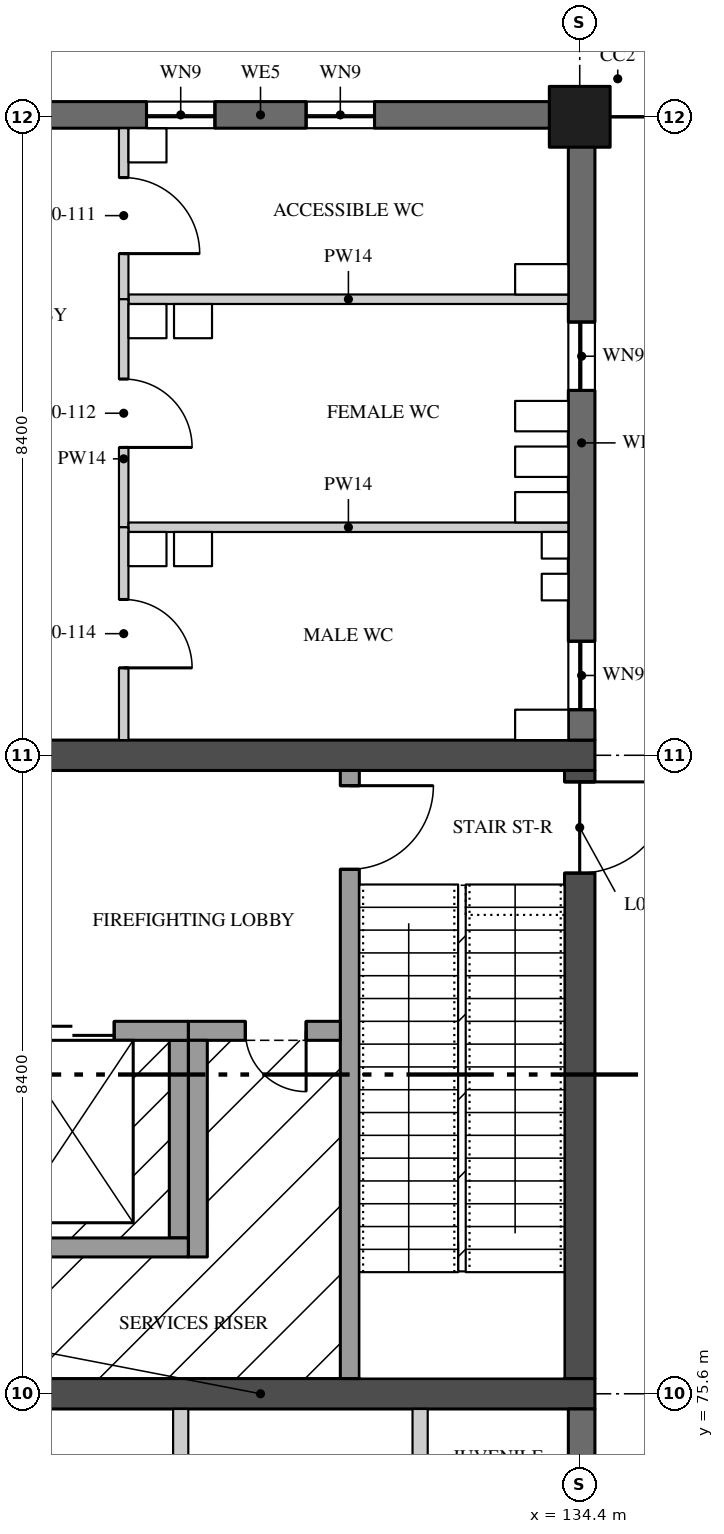
"""IFC4 building model, lengths in metres.
Left out: names, types, materials, properties, quantities, classifications, styles, units other than length and angle.
Written with IfcOpenShell. Run it as: python <this file> out.ifc"""

import sys

from ifc_helpers import new_model, si_unit, direction, frame, frame_2d, origin, origin_2d, place, context, subcontext, project, spatial, rectangle, extrude, element, fill, save


model = new_model("IFC4")
c1 = context("Model", 3, precision=1e-05, world=origin(), true_north=direction((0.0, 1.0)))
c2 = subcontext(c1, "Body", "Model", "MODEL_VIEW")
j1 = project(units=[si_unit("LENGTHUNIT", "METRE"), si_unit("PLANEANGLEUNIT", "RADIAN")], contexts=[c1])
p1 = place(None, origin())
s1 = spatial("IfcSite", under=j1, at=p1, CompositionType="ELEMENT")
p2 = place(p1, origin())
s2 = spatial("IfcBuilding", under=s1, at=p2, CompositionType="ELEMENT")
p3 = place(p2, origin())
s3 = spatial("IfcBuildingStorey", under=s2, at=p3, CompositionType="ELEMENT", Elevation=0.0)
p4 = place(p3, frame((134.4, 92.4, 0.0), z_axis=(0.0, 0.0, 1.0), x_axis=(1.0, 0.0, 0.0)))
e1 = element("IfcColumn", 1, at=p4, inside=s3, PredefinedType="COLUMN", context=c2, shape_type="SweptSolid", body=[
    extrude(rectangle(XDim=0.8, YDim=0.8, at=origin_2d()), origin(), (0.0, 0.0, 1.0), 5.05),
])
for number, where, z_axis, x_axis in (
    (2, (125.8, 75.6, 0.0), (0.0, 0.0, 1.0), (1.0, 0.0, 0.0)),
    (3, (125.8, 84.0, 0.0), (0.0, 0.0, 1.0), (1.0, 0.0, 0.0)),
):
    element("IfcWall", number, at=place(p3, frame(where, z_axis=z_axis, x_axis=x_axis)), inside=s3, PredefinedType="SHEAR", context=c2, shape_type="SweptSolid", body=[
        extrude(rectangle(XDim=8.8, YDim=0.4, at=frame_2d((4.4, 0.0))), origin(), (0.0, 0.0, 1.0), 5.05),
    ])
p5 = place(p3, frame((134.4, 75.8, 0.0), z_axis=(0.0, 0.0, 1.0), x_axis=(0.0, 1.0, 0.0)))
e4 = element("IfcWall", 4, at=p5, inside=s3, PredefinedType="SHEAR", context=c2, shape_type="SweptSolid", body=[
    extrude(rectangle(XDim=8.0, YDim=0.4, at=frame_2d((4.0, 0.0))), origin(), (0.0, 0.0, 1.0), 5.05),
])
p6 = place(p5, frame((6.65, 0.0, 0.0)))
e5 = element("IfcOpeningElement", 5, at=p6, cuts=e4, PredefinedType="OPENING", context=c2, shape_type="SweptSolid", body=[
    extrude(rectangle(XDim=1.2, YDim=2.1, at=frame_2d((0.6, 1.05))), frame((0.0, 0.21, 0.0), z_axis=(0.0, -1.0, 0.0), x_axis=(1.0, 0.0, 0.0)), (0.0, 0.0, 1.0), 0.42),
])
p7 = place(p3, frame((131.375, 83.8, 0.0), z_axis=(0.0, 0.0, 1.0), x_axis=(0.0, -1.0, 0.0)))
e6 = element("IfcWall", 6, at=p7, inside=s3, PredefinedType="SOLIDWALL", context=c2, shape_type="SweptSolid", body=[
    extrude(rectangle(XDim=8.0, YDim=0.25, at=frame_2d((4.0, 0.0))), origin(), (0.0, 0.0, 1.0), 5.05),
])
p8 = place(p7, frame((0.2, 0.0, 0.0)))
e7 = element("IfcOpeningElement", 7, at=p8, cuts=e6, PredefinedType="OPENING", context=c2, shape_type="SweptSolid", body=[
    extrude(rectangle(XDim=1.1, YDim=2.1, at=frame_2d((0.55, 1.05))), frame((0.0, 0.135, 0.0), z_axis=(0.0, -1.0, 0.0), x_axis=(1.0, 0.0, 0.0)), (0.0, 0.0, 1.0), 0.27),
])
p9 = place(p3, frame((131.25, 80.375, 0.0), z_axis=(0.0, 0.0, 1.0), x_axis=(-1.0, 0.0, 0.0)))
e8 = element("IfcWall", 8, at=p9, inside=s3, PredefinedType="SOLIDWALL", context=c2, shape_type="SweptSolid", body=[
    extrude(rectangle(XDim=2.0, YDim=0.25, at=frame_2d((1.0, 0.0))), origin(), (0.0, 0.0, 1.0), 5.05),
])
p10 = place(p9, frame((0.45, 0.0, 0.0)))
e9 = element("IfcOpeningElement", 9, at=p10, cuts=e8, PredefinedType="OPENING", context=c2, shape_type="SweptSolid", body=[
    extrude(rectangle(XDim=0.8, YDim=2.1, at=frame_2d((0.4, 1.05))), frame((0.0, 0.135, 0.0), z_axis=(0.0, -1.0, 0.0), x_axis=(1.0, 0.0, 0.0)), (0.0, 0.0, 1.0), 0.27),
])
p11 = place(p3, frame((129.375, 80.25, 0.0), z_axis=(0.0, 0.0, 1.0), x_axis=(0.0, -1.0, 0.0)))
e10 = element("IfcWall", 10, at=p11, inside=s3, PredefinedType="SOLIDWALL", context=c2, shape_type="SweptSolid", body=[
    extrude(rectangle(XDim=2.85, YDim=0.25, at=frame_2d((1.425, 0.0))), origin(), (0.0, 0.0, 1.0), 5.05),
])
p12 = place(p3, frame((129.125, 77.65, 0.0), z_axis=(0.0, 0.0, 1.0), x_axis=(0.0, 1.0, 0.0)))
e11 = element("IfcWall", 11, at=p12, inside=s3, PredefinedType="SOLIDWALL", context=c2, shape_type="SweptSolid", body=[
    extrude(rectangle(XDim=2.6, YDim=0.25, at=frame_2d((1.3, 0.0))), origin(), (0.0, 0.0, 1.0), 5.05),
])
p13 = place(p3, frame((126.2, 80.375, 0.0), z_axis=(0.0, 0.0, 1.0), x_axis=(1.0, 0.0, 0.0)))
e12 = element("IfcWall", 12, at=p13, inside=s3, PredefinedType="SOLIDWALL", context=c2, shape_type="SweptSolid", body=[
    extrude(rectangle(XDim=3.05, YDim=0.25, at=frame_2d((1.525, 0.0))), origin(), (0.0, 0.0, 1.0), 5.05),
])
p14 = place(p13, frame((0.975, 0.0, 0.0)))
e13 = element("IfcOpeningElement", 13, at=p14, cuts=e12, PredefinedType="OPENING", context=c2, shape_type="SweptSolid", body=[
    extrude(rectangle(XDim=1.1, YDim=2.1, at=frame_2d((0.55, 1.05))), frame((0.0, 0.135, 0.0), z_axis=(0.0, -1.0, 0.0), x_axis=(1.0, 0.0, 0.0)), (0.0, 0.0, 1.0), 0.27),
])
p15 = place(p3, frame((126.2, 77.525, 0.0), z_axis=(0.0, 0.0, 1.0), x_axis=(1.0, 0.0, 0.0)))
e14 = element("IfcWall", 14, at=p15, inside=s3, PredefinedType="SOLIDWALL", context=c2, shape_type="SweptSolid", body=[
    extrude(rectangle(XDim=3.05, YDim=0.25, at=frame_2d((1.525, 0.0))), origin(), (0.0, 0.0, 1.0), 5.05),
])
for number, where, z_axis, x_axis in (
    (15, (129.15, 72.4, 0.0), (0.0, 0.0, 1.0), (0.0, 1.0, 0.0)),
    (16, (132.3, 72.4, 0.0), (0.0, 0.0, 1.0), (0.0, 1.0, 0.0)),
):
    element("IfcWall", number, at=place(p3, frame(where, z_axis=z_axis, x_axis=x_axis)), inside=s3, PredefinedType="PARTITIONING", context=c2, shape_type="SweptSolid", body=[
        extrude(rectangle(XDim=3.0, YDim=0.2, at=frame_2d((1.5, 0.0))), origin(), (0.0, 0.0, 1.0), 5.05),
    ])
p16 = place(p3, frame((128.463, 90.0, 0.0), z_axis=(0.0, 0.0, 1.0), x_axis=(1.0, 0.0, 0.0)))
e17 = element("IfcWall", 17, at=p16, inside=s3, PredefinedType="PARTITIONING", context=c2, shape_type="SweptSolid", body=[
    extrude(rectangle(XDim=5.787, YDim=0.125, at=frame_2d((2.894, 0.0))), origin(), (0.0, 0.0, 1.0), 5.05),
])
p17 = place(p3, frame((128.4, 90.0, 0.0), z_axis=(0.0, 0.0, 1.0), x_axis=(0.0, 1.0, 0.0)))
e18 = element("IfcWall", 18, at=p17, inside=s3, PredefinedType="PARTITIONING", context=c2, shape_type="SweptSolid", body=[
    extrude(rectangle(XDim=2.25, YDim=0.125, at=frame_2d((1.125, 0.0))), origin(), (0.0, 0.0, 1.0), 5.05),
])
p18 = place(p17, frame((0.6, 0.0, 0.0)))
e19 = element("IfcOpeningElement", 19, at=p18, cuts=e18, PredefinedType="OPENING", context=c2, shape_type="SweptSolid", body=[
    extrude(rectangle(XDim=1.0, YDim=2.1, at=frame_2d((0.5, 1.05))), frame((0.0, 0.073, 0.0), z_axis=(0.0, -1.0, 0.0), x_axis=(1.0, 0.0, 0.0)), (0.0, 0.0, 1.0), 0.145),
])
p19 = place(p3, frame((128.4, 87.0, 0.0), z_axis=(0.0, 0.0, 1.0), x_axis=(0.0, 1.0, 0.0)))
e20 = element("IfcWall", 20, at=p19, inside=s3, PredefinedType="PARTITIONING", context=c2, shape_type="SweptSolid", body=[
    extrude(rectangle(XDim=3.0, YDim=0.125, at=frame_2d((1.5, 0.0))), origin(), (0.0, 0.0, 1.0), 5.05),
])
p20 = place(p19, frame((1.05, 0.0, 0.0)))
e21 = element("IfcOpeningElement", 21, at=p20, cuts=e20, PredefinedType="OPENING", context=c2, shape_type="SweptSolid", body=[
    extrude(rectangle(XDim=0.9, YDim=2.1, at=frame_2d((0.45, 1.05))), frame((0.0, 0.073, 0.0), z_axis=(0.0, -1.0, 0.0), x_axis=(1.0, 0.0, 0.0)), (0.0, 0.0, 1.0), 0.145),
])
p21 = place(p3, frame((128.463, 87.0, 0.0), z_axis=(0.0, 0.0, 1.0), x_axis=(1.0, 0.0, 0.0)))
e22 = element("IfcWall", 22, at=p21, inside=s3, PredefinedType="PARTITIONING", context=c2, shape_type="SweptSolid", body=[
    extrude(rectangle(XDim=5.787, YDim=0.125, at=frame_2d((2.894, 0.0))), origin(), (0.0, 0.0, 1.0), 5.05),
])
p22 = place(p3, frame((128.4, 84.2, 0.0), z_axis=(0.0, 0.0, 1.0), x_axis=(0.0, 1.0, 0.0)))
e23 = element("IfcWall", 23, at=p22, inside=s3, PredefinedType="PARTITIONING", context=c2, shape_type="SweptSolid", body=[
    extrude(rectangle(XDim=2.8, YDim=0.125, at=frame_2d((1.4, 0.0))), origin(), (0.0, 0.0, 1.0), 5.05),
])
p23 = place(p22, frame((0.95, 0.0, 0.0)))
e24 = element("IfcOpeningElement", 24, at=p23, cuts=e23, PredefinedType="OPENING", context=c2, shape_type="SweptSolid", body=[
    extrude(rectangle(XDim=0.9, YDim=2.1, at=frame_2d((0.45, 1.05))), frame((0.0, 0.073, 0.0), z_axis=(0.0, -1.0, 0.0), x_axis=(1.0, 0.0, 0.0)), (0.0, 0.0, 1.0), 0.145),
])
p24 = place(p3, frame((134.425, 67.58, 0.0), z_axis=(0.0, 0.0, 1.0), x_axis=(0.0, 1.0, 0.0)))
e25 = element("IfcWall", 25, at=p24, inside=s3, PredefinedType="SOLIDWALL", context=c2, shape_type="SweptSolid", body=[
    extrude(rectangle(XDim=7.82, YDim=0.35, at=frame_2d((3.91, 0.0))), origin(), (0.0, 0.0, 1.0), 5.05),
])
p25 = place(p3, frame((134.425, 84.2, 0.0), z_axis=(0.0, 0.0, 1.0), x_axis=(0.0, 1.0, 0.0)))
e26 = element("IfcWall", 26, at=p25, inside=s3, PredefinedType="SOLIDWALL", context=c2, shape_type="SweptSolid", body=[
    extrude(rectangle(XDim=7.82, YDim=0.35, at=frame_2d((3.91, 0.0))), origin(), (0.0, 0.0, 1.0), 5.05),
])
p26 = place(p25, frame((0.4, 0.0, 1.5)))
e27 = element("IfcOpeningElement", 27, at=p26, cuts=e26, PredefinedType="OPENING", context=c2, shape_type="SweptSolid", body=[
    extrude(rectangle(XDim=0.9, YDim=1.2, at=frame_2d((0.45, 0.6))), frame((0.0, 0.185, 0.0), z_axis=(0.0, -1.0, 0.0), x_axis=(1.0, 0.0, 0.0)), (0.0, 0.0, 1.0), 0.37),
])
p27 = place(p25, frame((4.6, 0.0, 1.5)))
e28 = element("IfcOpeningElement", 28, at=p27, cuts=e26, PredefinedType="OPENING", context=c2, shape_type="SweptSolid", body=[
    extrude(rectangle(XDim=0.9, YDim=1.2, at=frame_2d((0.45, 0.6))), frame((0.0, 0.185, 0.0), z_axis=(0.0, -1.0, 0.0), x_axis=(1.0, 0.0, 0.0)), (0.0, 0.0, 1.0), 0.37),
])
p28 = place(p3, frame((134.02, 92.425, 0.0), z_axis=(0.0, 0.0, 1.0), x_axis=(-1.0, 0.0, 0.0)))
e29 = element("IfcWall", 29, at=p28, inside=s3, PredefinedType="SOLIDWALL", context=c2, shape_type="SweptSolid", body=[
    extrude(rectangle(XDim=7.64, YDim=0.35, at=frame_2d((3.82, 0.0))), origin(), (0.0, 0.0, 1.0), 5.05),
])
p29 = place(p28, frame((2.32, 0.0, 1.5)))
e30 = element("IfcOpeningElement", 30, at=p29, cuts=e29, PredefinedType="OPENING", context=c2, shape_type="SweptSolid", body=[
    extrude(rectangle(XDim=0.9, YDim=1.2, at=frame_2d((0.45, 0.6))), frame((0.0, 0.185, 0.0), z_axis=(0.0, -1.0, 0.0), x_axis=(1.0, 0.0, 0.0)), (0.0, 0.0, 1.0), 0.37),
])
p30 = place(p28, frame((4.42, 0.0, 1.5)))
e31 = element("IfcOpeningElement", 31, at=p30, cuts=e29, PredefinedType="OPENING", context=c2, shape_type="SweptSolid", body=[
    extrude(rectangle(XDim=0.9, YDim=1.2, at=frame_2d((0.45, 0.6))), frame((0.0, 0.185, 0.0), z_axis=(0.0, -1.0, 0.0), x_axis=(1.0, 0.0, 0.0)), (0.0, 0.0, 1.0), 0.37),
])
p31 = place(p10, origin())
e32 = element("IfcDoor", 32, at=p31, inside=s3, OperationType="SINGLE_SWING_RIGHT", PredefinedType="DOOR", context=c2, shape_type="SweptSolid", body=[
    extrude(rectangle(XDim=0.8, YDim=2.1, at=frame_2d((0.4, 1.05))), frame((0.0, 0.035, 0.0), z_axis=(0.0, -1.0, 0.0), x_axis=(1.0, 0.0, 0.0)), (0.0, 0.0, 1.0), 0.07),
])
fill(e9, e32)
p32 = place(p8, origin())
e33 = element("IfcDoor", 33, at=p32, inside=s3, OperationType="SINGLE_SWING_RIGHT", PredefinedType="DOOR", context=c2, shape_type="SweptSolid", body=[
    extrude(rectangle(XDim=1.1, YDim=2.1, at=frame_2d((0.55, 1.05))), frame((0.0, 0.035, 0.0), z_axis=(0.0, -1.0, 0.0), x_axis=(1.0, 0.0, 0.0)), (0.0, 0.0, 1.0), 0.07),
])
fill(e7, e33)
p33 = place(p6, frame((1.2, 0.0, 0.0), z_axis=(0.0, 0.0, 1.0), x_axis=(-1.0, 0.0, 0.0)))
e34 = element("IfcDoor", 34, at=p33, inside=s3, OperationType="SINGLE_SWING_RIGHT", PredefinedType="DOOR", context=c2, shape_type="SweptSolid", body=[
    extrude(rectangle(XDim=1.2, YDim=2.1, at=frame_2d((0.6, 1.05))), frame((0.0, 0.035, 0.0), z_axis=(0.0, -1.0, 0.0), x_axis=(1.0, 0.0, 0.0)), (0.0, 0.0, 1.0), 0.07),
])
fill(e5, e34)
p34 = place(p14, origin())
e35 = element("IfcDoor", 35, at=p34, inside=s3, OperationType="DOUBLE_DOOR_SLIDING", PredefinedType="DOOR", context=c2, shape_type="SweptSolid", body=[
    extrude(rectangle(XDim=1.1, YDim=2.1, at=frame_2d((0.55, 1.05))), frame((0.0, 0.04, 0.0), z_axis=(0.0, -1.0, 0.0), x_axis=(1.0, 0.0, 0.0)), (0.0, 0.0, 1.0), 0.08),
])
fill(e13, e35)
p35 = place(p18, frame((1.0, 0.0, 0.0), z_axis=(0.0, 0.0, 1.0), x_axis=(-1.0, 0.0, 0.0)))
e36 = element("IfcDoor", 36, at=p35, inside=s3, OperationType="SINGLE_SWING_LEFT", PredefinedType="DOOR", context=c2, shape_type="SweptSolid", body=[
    extrude(rectangle(XDim=1.0, YDim=2.1, at=frame_2d((0.5, 1.05))), frame((0.0, 0.02, 0.0), z_axis=(0.0, -1.0, 0.0), x_axis=(1.0, 0.0, 0.0)), (0.0, 0.0, 1.0), 0.04),
])
fill(e19, e36)
p36 = place(p20, frame((0.9, 0.0, 0.0), z_axis=(0.0, 0.0, 1.0), x_axis=(-1.0, 0.0, 0.0)))
e37 = element("IfcDoor", 37, at=p36, inside=s3, OperationType="SINGLE_SWING_LEFT", PredefinedType="DOOR", context=c2, shape_type="SweptSolid", body=[
    extrude(rectangle(XDim=0.9, YDim=2.1, at=frame_2d((0.45, 1.05))), frame((0.0, 0.02, 0.0), z_axis=(0.0, -1.0, 0.0), x_axis=(1.0, 0.0, 0.0)), (0.0, 0.0, 1.0), 0.04),
])
fill(e21, e37)
p37 = place(p23, frame((0.9, 0.0, 0.0), z_axis=(0.0, 0.0, 1.0), x_axis=(-1.0, 0.0, 0.0)))
e38 = element("IfcDoor", 38, at=p37, inside=s3, OperationType="SINGLE_SWING_LEFT", PredefinedType="DOOR", context=c2, shape_type="SweptSolid", body=[
    extrude(rectangle(XDim=0.9, YDim=2.1, at=frame_2d((0.45, 1.05))), frame((0.0, 0.02, 0.0), z_axis=(0.0, -1.0, 0.0), x_axis=(1.0, 0.0, 0.0)), (0.0, 0.0, 1.0), 0.04),
])
fill(e24, e38)
p38 = place(p26, origin())
e39 = element("IfcWindow", 39, at=p38, inside=s3, PartitioningType="SINGLE_PANEL", PredefinedType="WINDOW", context=c2, shape_type="SweptSolid", body=[
    extrude(rectangle(XDim=0.9, YDim=1.2, at=frame_2d((0.45, 0.6))), frame((0.0, 0.05, 0.0), z_axis=(0.0, -1.0, 0.0), x_axis=(1.0, 0.0, 0.0)), (0.0, 0.0, 1.0), 0.1),
])
fill(e27, e39)
p39 = place(p27, origin())
e40 = element("IfcWindow", 40, at=p39, inside=s3, PartitioningType="SINGLE_PANEL", PredefinedType="WINDOW", context=c2, shape_type="SweptSolid", body=[
    extrude(rectangle(XDim=0.9, YDim=1.2, at=frame_2d((0.45, 0.6))), frame((0.0, 0.05, 0.0), z_axis=(0.0, -1.0, 0.0), x_axis=(1.0, 0.0, 0.0)), (0.0, 0.0, 1.0), 0.1),
])
fill(e28, e40)
p40 = place(p29, origin())
e41 = element("IfcWindow", 41, at=p40, inside=s3, PartitioningType="SINGLE_PANEL", PredefinedType="WINDOW", context=c2, shape_type="SweptSolid", body=[
    extrude(rectangle(XDim=0.9, YDim=1.2, at=frame_2d((0.45, 0.6))), frame((0.0, 0.05, 0.0), z_axis=(0.0, -1.0, 0.0), x_axis=(1.0, 0.0, 0.0)), (0.0, 0.0, 1.0), 0.1),
])
fill(e30, e41)
p41 = place(p30, origin())
e42 = element("IfcWindow", 42, at=p41, inside=s3, PartitioningType="SINGLE_PANEL", PredefinedType="WINDOW", context=c2, shape_type="SweptSolid", body=[
    extrude(rectangle(XDim=0.9, YDim=1.2, at=frame_2d((0.45, 0.6))), frame((0.0, 0.05, 0.0), z_axis=(0.0, -1.0, 0.0), x_axis=(1.0, 0.0, 0.0)), (0.0, 0.0, 1.0), 0.1),
])
fill(e31, e42)
save(model, sys.argv[1])
